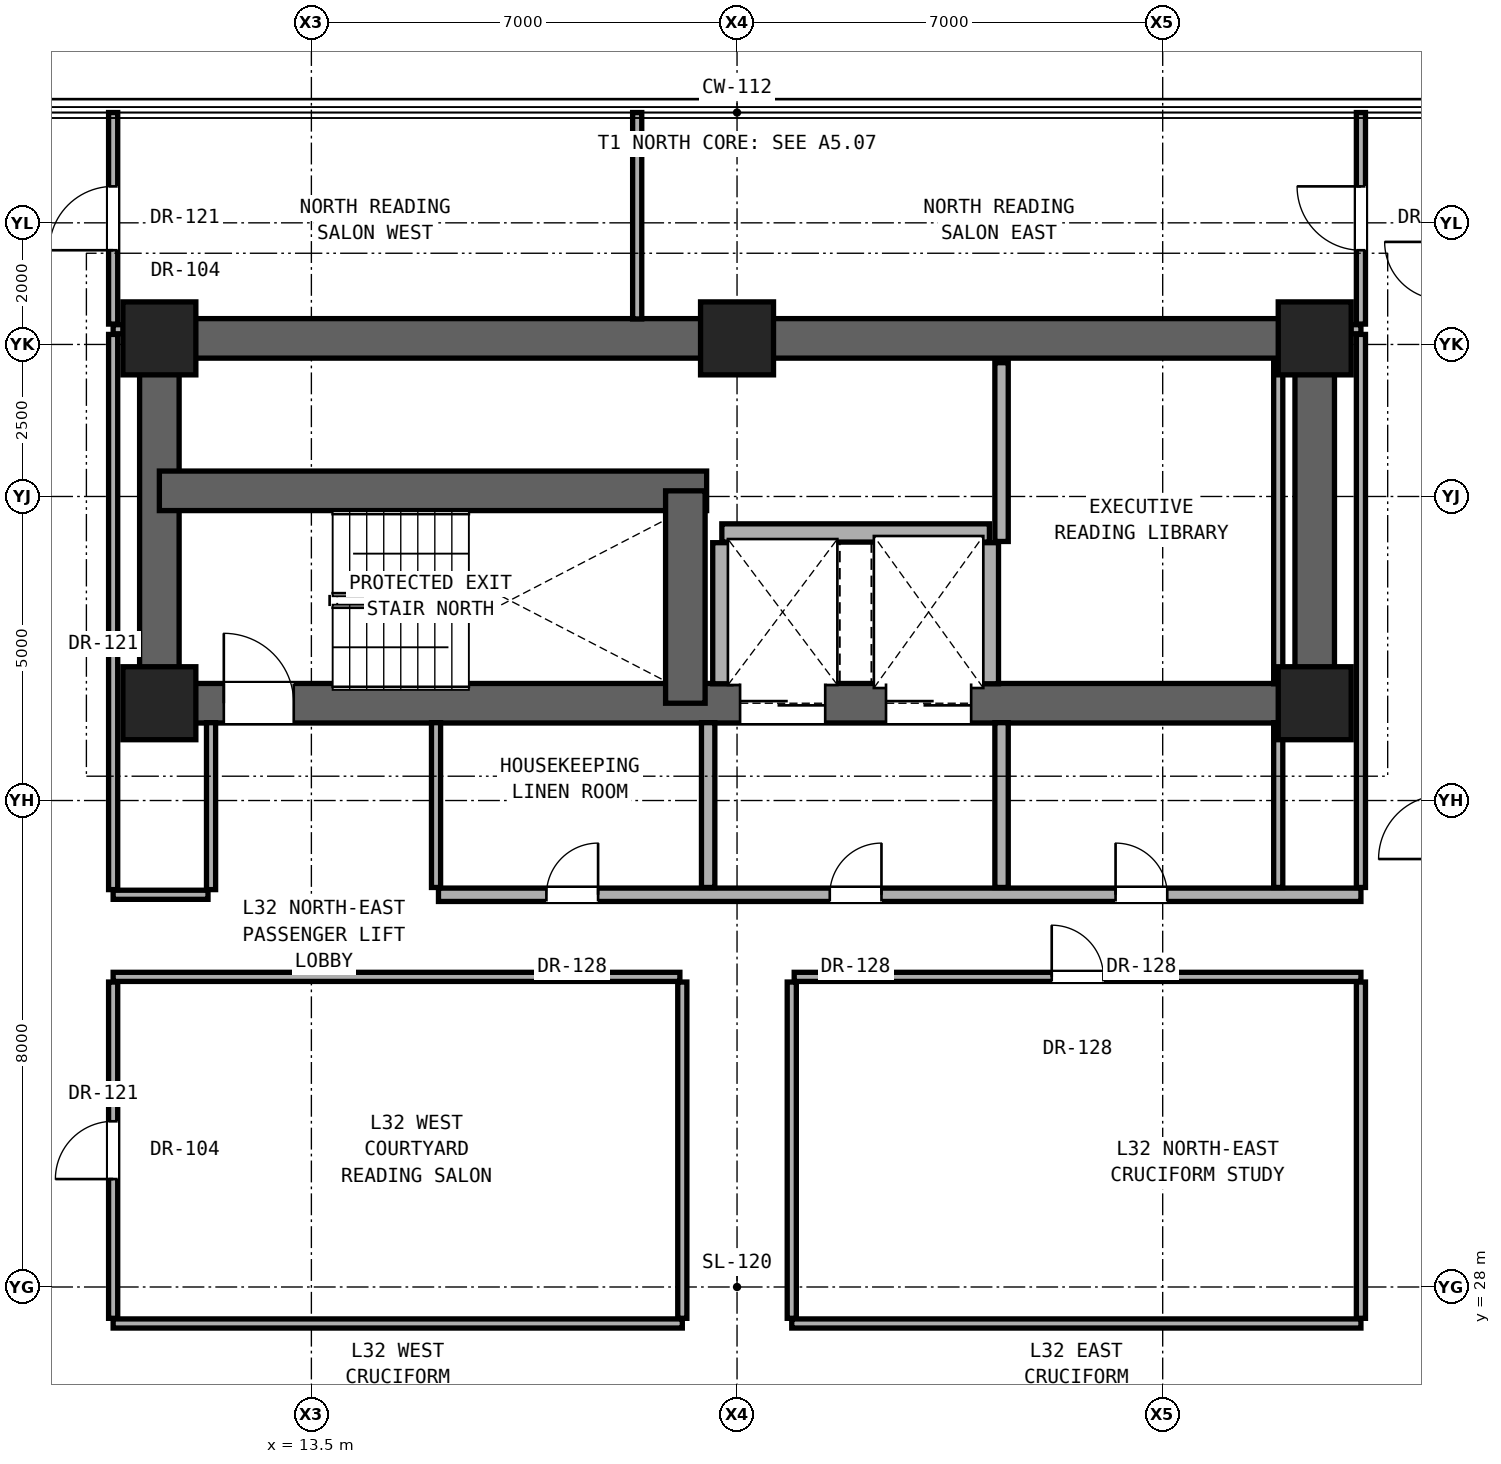
"""IFC4 building model, lengths in metres.
Left out: names, types, materials, properties, quantities, classifications, styles, units other than length and angle.
Written with IfcOpenShell. Run it as: python <this file> out.ifc"""

import sys

from ifc_helpers import new_model, si_unit, direction, frame, frame_2d, origin, origin_2d, place, context, subcontext, project, spatial, rectangle, extrude, element, fill, save


model = new_model("IFC4")
c1 = context("Model", 3, precision=1e-05, world=origin(), true_north=direction((0.0, 1.0)))
c2 = subcontext(c1, "Body", "Model", "MODEL_VIEW")
j1 = project(units=[si_unit("LENGTHUNIT", "METRE"), si_unit("PLANEANGLEUNIT", "RADIAN")], contexts=[c1])
p1 = place(None, origin())
s1 = spatial("IfcSite", under=j1, at=p1, CompositionType="ELEMENT")
p2 = place(p1, origin())
s2 = spatial("IfcBuilding", under=s1, at=p2, CompositionType="ELEMENT")
p3 = place(p2, frame((0.0, 0.0, 114.8)))
s3 = spatial("IfcBuildingStorey", under=s2, at=p3, CompositionType="ELEMENT", Elevation=114.8)
for number, where, z_axis, x_axis in (
    (1, (11.0, 37.6, 0.0), (0.0, 0.0, 1.0), (1.0, 0.0, 0.0)),
    (2, (30.0, 37.6, 0.0), (0.0, 0.0, 1.0), (1.0, 0.0, 0.0)),
    (3, (11.0, 43.6, 0.0), (0.0, 0.0, 1.0), (1.0, 0.0, 0.0)),
    (4, (20.5, 43.6, 0.0), (0.0, 0.0, 1.0), (1.0, 0.0, 0.0)),
    (5, (30.0, 43.6, 0.0), (0.0, 0.0, 1.0), (1.0, 0.0, 0.0)),
):
    element("IfcColumn", number, at=place(p3, frame(where, z_axis=z_axis, x_axis=x_axis)), inside=s3, PredefinedType="COLUMN", context=c2, shape_type="SweptSolid", body=[
        extrude(rectangle(XDim=1.2, YDim=1.2, at=origin_2d()), origin(), (0.0, 0.0, 1.0), 3.3),
    ])
p4 = place(p3, frame((11.0, 43.6, 0.0), z_axis=(0.0, 0.0, 1.0), x_axis=(1.0, 0.0, 0.0)))
e6 = element("IfcWall", 6, at=p4, inside=s3, PredefinedType="SHEAR", context=c2, shape_type="SweptSolid", body=[
    extrude(rectangle(XDim=19.0, YDim=0.65, at=frame_2d((9.5, 0.0))), origin(), (0.0, 0.0, 1.0), 3.08),
])
for number, where, z_axis, x_axis in (
    (7, (11.0, 37.6, 0.0), (0.0, 0.0, 1.0), (0.0, 1.0, 0.0)),
    (8, (30.0, 37.6, 0.0), (0.0, 0.0, 1.0), (0.0, 1.0, 0.0)),
):
    element("IfcWall", number, at=place(p3, frame(where, z_axis=z_axis, x_axis=x_axis)), inside=s3, PredefinedType="SHEAR", context=c2, shape_type="SweptSolid", body=[
        extrude(rectangle(XDim=6.0, YDim=0.65, at=frame_2d((3.0, 0.0))), origin(), (0.0, 0.0, 1.0), 3.08),
    ])
p5 = place(p3, frame((11.0, 37.6, 0.0), z_axis=(0.0, 0.0, 1.0), x_axis=(1.0, 0.0, 0.0)))
e9 = element("IfcWall", 9, at=p5, inside=s3, PredefinedType="SHEAR", context=c2, shape_type="SweptSolid", body=[
    extrude(rectangle(XDim=19.0, YDim=0.65, at=frame_2d((9.5, 0.0))), origin(), (0.0, 0.0, 1.0), 3.08),
])
p6 = place(p5, frame((1.06, 0.0, 0.0)))
e10 = element("IfcOpeningElement", 10, at=p6, cuts=e9, PredefinedType="OPENING", context=c2, shape_type="SweptSolid", body=[
    extrude(rectangle(XDim=1.15, YDim=2.2, at=frame_2d((0.575, 1.1))), frame((0.0, 0.335, 0.0), z_axis=(0.0, -1.0, 0.0), x_axis=(1.0, 0.0, 0.0)), (0.0, 0.0, 1.0), 0.67),
])
p7 = place(p5, frame((9.55, 0.0, 0.0)))
e11 = element("IfcOpeningElement", 11, at=p7, cuts=e9, PredefinedType="OPENING", context=c2, shape_type="SweptSolid", body=[
    extrude(rectangle(XDim=1.4, YDim=2.35, at=frame_2d((0.7, 1.175))), frame((0.0, 0.335, 0.0), z_axis=(0.0, -1.0, 0.0), x_axis=(1.0, 0.0, 0.0)), (0.0, 0.0, 1.0), 0.67),
])
p8 = place(p5, frame((11.95, 0.0, 0.0)))
e12 = element("IfcOpeningElement", 12, at=p8, cuts=e9, PredefinedType="OPENING", context=c2, shape_type="SweptSolid", body=[
    extrude(rectangle(XDim=1.4, YDim=2.35, at=frame_2d((0.7, 1.175))), frame((0.0, 0.335, 0.0), z_axis=(0.0, -1.0, 0.0), x_axis=(1.0, 0.0, 0.0)), (0.0, 0.0, 1.0), 0.67),
])
p9 = place(p3, frame((11.0, 41.093, 0.0), z_axis=(0.0, 0.0, 1.0), x_axis=(1.0, 0.0, 0.0)))
e13 = element("IfcWall", 13, at=p9, inside=s3, PredefinedType="SHEAR", context=c2, shape_type="SweptSolid", body=[
    extrude(rectangle(XDim=9.0, YDim=0.65, at=frame_2d((4.5, 0.0))), origin(), (0.0, 0.0, 1.0), 3.08),
])
p10 = place(p3, frame((19.65, 37.6, 0.0), z_axis=(0.0, 0.0, 1.0), x_axis=(0.0, 1.0, 0.0)))
e14 = element("IfcWall", 14, at=p10, inside=s3, PredefinedType="SHEAR", context=c2, shape_type="SweptSolid", body=[
    extrude(rectangle(XDim=3.493, YDim=0.65, at=frame_2d((1.747, 0.0))), origin(), (0.0, 0.0, 1.0), 3.08),
])
for number, where, z_axis, x_axis in (
    (15, (10.24, 27.4, 0.0), (0.0, 0.0, 1.0), (1.0, 0.0, 0.0)),
    (16, (21.4, 27.4, 0.0), (0.0, 0.0, 1.0), (1.0, 0.0, 0.0)),
):
    element("IfcWall", number, at=place(p3, frame(where, z_axis=z_axis, x_axis=x_axis)), inside=s3, PredefinedType="PARTITIONING", context=c2, shape_type="SweptSolid", body=[
        extrude(rectangle(XDim=9.36, YDim=0.15, at=frame_2d((4.68, 0.0))), origin(), (0.0, 0.0, 1.0), 2.124),
    ])
p11 = place(p3, frame((10.24, 33.1, 0.0), z_axis=(0.0, 0.0, 1.0), x_axis=(1.0, 0.0, 0.0)))
e17 = element("IfcWall", 17, at=p11, inside=s3, PredefinedType="PARTITIONING", context=c2, shape_type="SweptSolid", body=[
    extrude(rectangle(XDim=9.32, YDim=0.15, at=frame_2d((4.66, 0.0))), origin(), (0.0, 0.0, 1.0), 2.124),
])
p12 = place(p3, frame((21.44, 33.1, 0.0), z_axis=(0.0, 0.0, 1.0), x_axis=(1.0, 0.0, 0.0)))
e18 = element("IfcWall", 18, at=p12, inside=s3, PredefinedType="PARTITIONING", context=c2, shape_type="SweptSolid", body=[
    extrude(rectangle(XDim=9.32, YDim=0.15, at=frame_2d((4.66, 0.0))), origin(), (0.0, 0.0, 1.0), 2.124),
])
p13 = place(p12, frame((4.235, 0.0, 0.0)))
e19 = element("IfcOpeningElement", 19, at=p13, cuts=e18, PredefinedType="OPENING", context=c2, shape_type="SweptSolid", body=[
    extrude(rectangle(XDim=0.85, YDim=2.01, at=frame_2d((0.425, 1.005))), frame((0.0, 0.085, 0.0), z_axis=(0.0, -1.0, 0.0), x_axis=(1.0, 0.0, 0.0)), (0.0, 0.0, 1.0), 0.17),
])
p14 = place(p3, frame((10.24, 34.45, 0.0), z_axis=(0.0, 0.0, 1.0), x_axis=(1.0, 0.0, 0.0)))
e20 = element("IfcWall", 20, at=p14, inside=s3, PredefinedType="PARTITIONING", context=c2, shape_type="SweptSolid", body=[
    extrude(rectangle(XDim=1.56, YDim=0.15, at=frame_2d((0.78, 0.0))), origin(), (0.0, 0.0, 1.0), 2.124),
])
p15 = place(p3, frame((15.59, 34.45, 0.0), z_axis=(0.0, 0.0, 1.0), x_axis=(1.0, 0.0, 0.0)))
e21 = element("IfcWall", 21, at=p15, inside=s3, PredefinedType="SOLIDWALL", context=c2, shape_type="SweptSolid", body=[
    extrude(rectangle(XDim=15.17, YDim=0.22, at=frame_2d((7.585, 0.0))), origin(), (0.0, 0.0, 1.0), 2.124),
])
p16 = place(p15, frame((6.435, 0.0, 0.0)))
e22 = element("IfcOpeningElement", 22, at=p16, cuts=e21, PredefinedType="OPENING", context=c2, shape_type="SweptSolid", body=[
    extrude(rectangle(XDim=0.85, YDim=2.01, at=frame_2d((0.425, 1.005))), frame((0.0, 0.12, 0.0), z_axis=(0.0, -1.0, 0.0), x_axis=(1.0, 0.0, 0.0)), (0.0, 0.0, 1.0), 0.24),
])
p17 = place(p15, frame((11.135, 0.0, 0.0)))
e23 = element("IfcOpeningElement", 23, at=p17, cuts=e21, PredefinedType="OPENING", context=c2, shape_type="SweptSolid", body=[
    extrude(rectangle(XDim=0.85, YDim=2.01, at=frame_2d((0.425, 1.005))), frame((0.0, 0.12, 0.0), z_axis=(0.0, -1.0, 0.0), x_axis=(1.0, 0.0, 0.0)), (0.0, 0.0, 1.0), 0.24),
])
p18 = place(p15, frame((1.775, 0.0, 0.0)))
e24 = element("IfcOpeningElement", 24, at=p18, cuts=e21, PredefinedType="OPENING", context=c2, shape_type="SweptSolid", body=[
    extrude(rectangle(XDim=0.85, YDim=2.01, at=frame_2d((0.425, 1.005))), frame((0.0, 0.12, 0.0), z_axis=(0.0, -1.0, 0.0), x_axis=(1.0, 0.0, 0.0)), (0.0, 0.0, 1.0), 0.24),
])
p19 = place(p3, frame((20.25, 40.4, 0.0), z_axis=(0.0, 0.0, 1.0), x_axis=(1.0, 0.0, 0.0)))
e25 = element("IfcWall", 25, at=p19, inside=s3, PredefinedType="SOLIDWALL", context=c2, shape_type="SweptSolid", body=[
    extrude(rectangle(XDim=4.4, YDim=0.3, at=frame_2d((2.2, 0.0))), origin(), (0.0, 0.0, 1.0), 3.08),
])
for number, where, z_axis, x_axis in (
    (26, (10.24, 43.75, 0.0), (0.0, 0.0, 1.0), (1.0, 0.0, 0.0)),
    (27, (30.32, 43.75, 0.0), (0.0, 0.0, 1.0), (1.0, 0.0, 0.0)),
):
    element("IfcWall", number, at=place(p3, frame(where, z_axis=z_axis, x_axis=x_axis)), inside=s3, PredefinedType="PARTITIONING", context=c2, shape_type="SweptSolid", body=[
        extrude(rectangle(XDim=0.44, YDim=0.15, at=frame_2d((0.22, 0.0))), origin(), (0.0, 0.0, 1.0), 3.08),
    ])
p20 = place(p3, frame((10.24, 27.485, 0.0), z_axis=(0.0, 0.0, 1.0), x_axis=(0.0, 1.0, 0.0)))
e28 = element("IfcWall", 28, at=p20, inside=s3, PredefinedType="PARTITIONING", context=c2, shape_type="SweptSolid", body=[
    extrude(rectangle(XDim=5.53, YDim=0.15, at=frame_2d((2.765, 0.0))), origin(), (0.0, 0.0, 1.0), 2.299),
])
p21 = place(p20, frame((2.29, 0.0, 0.0)))
e29 = element("IfcOpeningElement", 29, at=p21, cuts=e28, PredefinedType="OPENING", context=c2, shape_type="SweptSolid", body=[
    extrude(rectangle(XDim=0.95, YDim=2.15, at=frame_2d((0.475, 1.075))), frame((0.0, 0.085, 0.0), z_axis=(0.0, -1.0, 0.0), x_axis=(1.0, 0.0, 0.0)), (0.0, 0.0, 1.0), 0.17),
])
p22 = place(p3, frame((10.24, 34.535, 0.0), z_axis=(0.0, 0.0, 1.0), x_axis=(0.0, 1.0, 0.0)))
e30 = element("IfcWall", 30, at=p22, inside=s3, PredefinedType="PARTITIONING", context=c2, shape_type="SweptSolid", body=[
    extrude(rectangle(XDim=9.13, YDim=0.15, at=frame_2d((4.565, 0.0))), origin(), (0.0, 0.0, 1.0), 2.456),
])
p23 = place(p3, frame((10.24, 43.835, 0.0), z_axis=(0.0, 0.0, 1.0), x_axis=(0.0, 1.0, 0.0)))
e31 = element("IfcWall", 31, at=p23, inside=s3, PredefinedType="PARTITIONING", context=c2, shape_type="SweptSolid", body=[
    extrude(rectangle(XDim=3.479, YDim=0.15, at=frame_2d((1.74, 0.0))), origin(), (0.0, 0.0, 1.0), 3.08),
])
p24 = place(p23, frame((1.215, 0.0, 0.0)))
e32 = element("IfcOpeningElement", 32, at=p24, cuts=e31, PredefinedType="OPENING", context=c2, shape_type="SweptSolid", body=[
    extrude(rectangle(XDim=1.05, YDim=2.2, at=frame_2d((0.525, 1.1))), frame((0.0, 0.085, 0.0), z_axis=(0.0, -1.0, 0.0), x_axis=(1.0, 0.0, 0.0)), (0.0, 0.0, 1.0), 0.17),
])
p25 = place(p3, frame((11.85, 34.535, 0.0), z_axis=(0.0, 0.0, 1.0), x_axis=(0.0, 1.0, 0.0)))
e33 = element("IfcWall", 33, at=p25, inside=s3, PredefinedType="PARTITIONING", context=c2, shape_type="SweptSolid", body=[
    extrude(rectangle(XDim=2.745, YDim=0.15, at=frame_2d((1.373, 0.0))), origin(), (0.0, 0.0, 1.0), 3.08),
])
p26 = place(p3, frame((15.55, 34.57, 0.0), z_axis=(0.0, 0.0, 1.0), x_axis=(0.0, 1.0, 0.0)))
e34 = element("IfcWall", 34, at=p26, inside=s3, PredefinedType="PARTITIONING", context=c2, shape_type="SweptSolid", body=[
    extrude(rectangle(XDim=2.71, YDim=0.15, at=frame_2d((1.355, 0.0))), origin(), (0.0, 0.0, 1.0), 2.609),
])
p27 = place(p3, frame((18.858, 43.92, 0.0), z_axis=(0.0, 0.0, 1.0), x_axis=(0.0, 1.0, 0.0)))
e35 = element("IfcWall", 35, at=p27, inside=s3, PredefinedType="PARTITIONING", context=c2, shape_type="SweptSolid", body=[
    extrude(rectangle(XDim=3.394, YDim=0.15, at=frame_2d((1.697, 0.0))), origin(), (0.0, 0.0, 1.0), 3.08),
])
p28 = place(p3, frame((19.6, 27.485, 0.0), z_axis=(0.0, 0.0, 1.0), x_axis=(0.0, 1.0, 0.0)))
e36 = element("IfcWall", 36, at=p28, inside=s3, PredefinedType="PARTITIONING", context=c2, shape_type="SweptSolid", body=[
    extrude(rectangle(XDim=5.53, YDim=0.15, at=frame_2d((2.765, 0.0))), origin(), (0.0, 0.0, 1.0), 2.124),
])
p29 = place(p3, frame((20.025, 34.57, 0.0), z_axis=(0.0, 0.0, 1.0), x_axis=(0.0, 1.0, 0.0)))
e37 = element("IfcWall", 37, at=p29, inside=s3, PredefinedType="SOLIDWALL", context=c2, shape_type="SweptSolid", body=[
    extrude(rectangle(XDim=2.71, YDim=0.22, at=frame_2d((1.355, 0.0))), origin(), (0.0, 0.0, 1.0), 3.08),
])
p30 = place(p3, frame((20.25, 37.92, 0.0), z_axis=(0.0, 0.0, 1.0), x_axis=(0.0, 1.0, 0.0)))
e38 = element("IfcWall", 38, at=p30, inside=s3, PredefinedType="SOLIDWALL", context=c2, shape_type="SweptSolid", body=[
    extrude(rectangle(XDim=2.32, YDim=0.3, at=frame_2d((1.16, 0.0))), origin(), (0.0, 0.0, 1.0), 3.08),
])
p31 = place(p3, frame((21.4, 27.485, 0.0), z_axis=(0.0, 0.0, 1.0), x_axis=(0.0, 1.0, 0.0)))
e39 = element("IfcWall", 39, at=p31, inside=s3, PredefinedType="PARTITIONING", context=c2, shape_type="SweptSolid", body=[
    extrude(rectangle(XDim=5.53, YDim=0.15, at=frame_2d((2.765, 0.0))), origin(), (0.0, 0.0, 1.0), 2.124),
])
p32 = place(p3, frame((24.65, 37.92, 0.0), z_axis=(0.0, 0.0, 1.0), x_axis=(0.0, 1.0, 0.0)))
e40 = element("IfcWall", 40, at=p32, inside=s3, PredefinedType="SOLIDWALL", context=c2, shape_type="SweptSolid", body=[
    extrude(rectangle(XDim=2.32, YDim=0.3, at=frame_2d((1.16, 0.0))), origin(), (0.0, 0.0, 1.0), 3.08),
])
p33 = place(p3, frame((24.85, 34.57, 0.0), z_axis=(0.0, 0.0, 1.0), x_axis=(0.0, 1.0, 0.0)))
e41 = element("IfcWall", 41, at=p33, inside=s3, PredefinedType="SOLIDWALL", context=c2, shape_type="SweptSolid", body=[
    extrude(rectangle(XDim=2.71, YDim=0.22, at=frame_2d((1.355, 0.0))), origin(), (0.0, 0.0, 1.0), 3.08),
])
p34 = place(p3, frame((24.85, 40.26, 0.0), z_axis=(0.0, 0.0, 1.0), x_axis=(0.0, 1.0, 0.0)))
e42 = element("IfcWall", 42, at=p34, inside=s3, PredefinedType="SOLIDWALL", context=c2, shape_type="SweptSolid", body=[
    extrude(rectangle(XDim=2.94, YDim=0.22, at=frame_2d((1.47, 0.0))), origin(), (0.0, 0.0, 1.0), 3.08),
])
p35 = place(p3, frame((29.4, 34.57, 0.0), z_axis=(0.0, 0.0, 1.0), x_axis=(0.0, 1.0, 0.0)))
e43 = element("IfcWall", 43, at=p35, inside=s3, PredefinedType="PARTITIONING", context=c2, shape_type="SweptSolid", body=[
    extrude(rectangle(XDim=2.71, YDim=0.15, at=frame_2d((1.355, 0.0))), origin(), (0.0, 0.0, 1.0), 3.08),
])
p36 = place(p3, frame((29.4, 37.92, 0.0), z_axis=(0.0, 0.0, 1.0), x_axis=(0.0, 1.0, 0.0)))
e44 = element("IfcWall", 44, at=p36, inside=s3, PredefinedType="PARTITIONING", context=c2, shape_type="SweptSolid", body=[
    extrude(rectangle(XDim=5.28, YDim=0.15, at=frame_2d((2.64, 0.0))), origin(), (0.0, 0.0, 1.0), 3.08),
])
p37 = place(p3, frame((30.76, 27.485, 0.0), z_axis=(0.0, 0.0, 1.0), x_axis=(0.0, 1.0, 0.0)))
e45 = element("IfcWall", 45, at=p37, inside=s3, PredefinedType="PARTITIONING", context=c2, shape_type="SweptSolid", body=[
    extrude(rectangle(XDim=5.53, YDim=0.15, at=frame_2d((2.765, 0.0))), origin(), (0.0, 0.0, 1.0), 2.299),
])
p38 = place(p3, frame((30.76, 34.57, 0.0), z_axis=(0.0, 0.0, 1.0), x_axis=(0.0, 1.0, 0.0)))
e46 = element("IfcWall", 46, at=p38, inside=s3, PredefinedType="PARTITIONING", context=c2, shape_type="SweptSolid", body=[
    extrude(rectangle(XDim=9.095, YDim=0.15, at=frame_2d((4.547, 0.0))), origin(), (0.0, 0.0, 1.0), 2.456),
])
p39 = place(p3, frame((30.76, 43.835, 0.0), z_axis=(0.0, 0.0, 1.0), x_axis=(0.0, 1.0, 0.0)))
e47 = element("IfcWall", 47, at=p39, inside=s3, PredefinedType="PARTITIONING", context=c2, shape_type="SweptSolid", body=[
    extrude(rectangle(XDim=3.479, YDim=0.15, at=frame_2d((1.74, 0.0))), origin(), (0.0, 0.0, 1.0), 3.08),
])
p40 = place(p39, frame((1.215, 0.0, 0.0)))
e48 = element("IfcOpeningElement", 48, at=p40, cuts=e47, PredefinedType="OPENING", context=c2, shape_type="SweptSolid", body=[
    extrude(rectangle(XDim=1.05, YDim=2.2, at=frame_2d((0.525, 1.1))), frame((0.0, 0.085, 0.0), z_axis=(0.0, -1.0, 0.0), x_axis=(1.0, 0.0, 0.0)), (0.0, 0.0, 1.0), 0.17),
])
p41 = place(p6, origin())
e49 = element("IfcDoor", 49, at=p41, inside=s3, OperationType="SINGLE_SWING_LEFT", PredefinedType="DOOR", context=c2, shape_type="SweptSolid", body=[
    extrude(rectangle(XDim=1.15, YDim=2.2, at=frame_2d((0.575, 1.1))), frame((0.0, 0.025, 0.0), z_axis=(0.0, -1.0, 0.0), x_axis=(1.0, 0.0, 0.0)), (0.0, 0.0, 1.0), 0.05),
])
fill(e10, e49)
p42 = place(p16, origin())
e50 = element("IfcDoor", 50, at=p42, inside=s3, OperationType="SINGLE_SWING_RIGHT", PredefinedType="DOOR", context=c2, shape_type="SweptSolid", body=[
    extrude(rectangle(XDim=0.85, YDim=2.01, at=frame_2d((0.425, 1.005))), frame((0.0, 0.025, 0.0), z_axis=(0.0, -1.0, 0.0), x_axis=(1.0, 0.0, 0.0)), (0.0, 0.0, 1.0), 0.05),
])
fill(e22, e50)
p43 = place(p17, origin())
e51 = element("IfcDoor", 51, at=p43, inside=s3, OperationType="SINGLE_SWING_LEFT", PredefinedType="DOOR", context=c2, shape_type="SweptSolid", body=[
    extrude(rectangle(XDim=0.85, YDim=2.01, at=frame_2d((0.425, 1.005))), frame((0.0, 0.025, 0.0), z_axis=(0.0, -1.0, 0.0), x_axis=(1.0, 0.0, 0.0)), (0.0, 0.0, 1.0), 0.05),
])
fill(e23, e51)
p44 = place(p18, origin())
e52 = element("IfcDoor", 52, at=p44, inside=s3, OperationType="SINGLE_SWING_RIGHT", PredefinedType="DOOR", context=c2, shape_type="SweptSolid", body=[
    extrude(rectangle(XDim=0.85, YDim=2.01, at=frame_2d((0.425, 1.005))), frame((0.0, 0.025, 0.0), z_axis=(0.0, -1.0, 0.0), x_axis=(1.0, 0.0, 0.0)), (0.0, 0.0, 1.0), 0.05),
])
fill(e24, e52)
p45 = place(p21, origin())
e53 = element("IfcDoor", 53, at=p45, inside=s3, OperationType="SINGLE_SWING_LEFT", PredefinedType="DOOR", context=c2, shape_type="SweptSolid", body=[
    extrude(rectangle(XDim=0.95, YDim=2.15, at=frame_2d((0.475, 1.075))), frame((0.0, 0.025, 0.0), z_axis=(0.0, -1.0, 0.0), x_axis=(1.0, 0.0, 0.0)), (0.0, 0.0, 1.0), 0.05),
])
fill(e29, e53)
p46 = place(p13, origin())
e54 = element("IfcDoor", 54, at=p46, inside=s3, OperationType="SINGLE_SWING_LEFT", PredefinedType="DOOR", context=c2, shape_type="SweptSolid", body=[
    extrude(rectangle(XDim=0.85, YDim=2.01, at=frame_2d((0.425, 1.005))), frame((0.0, 0.025, 0.0), z_axis=(0.0, -1.0, 0.0), x_axis=(1.0, 0.0, 0.0)), (0.0, 0.0, 1.0), 0.05),
])
fill(e19, e54)
p47 = place(p24, origin())
e55 = element("IfcDoor", 55, at=p47, inside=s3, OperationType="SINGLE_SWING_LEFT", PredefinedType="DOOR", context=c2, shape_type="SweptSolid", body=[
    extrude(rectangle(XDim=1.05, YDim=2.2, at=frame_2d((0.525, 1.1))), frame((0.0, 0.025, 0.0), z_axis=(0.0, -1.0, 0.0), x_axis=(1.0, 0.0, 0.0)), (0.0, 0.0, 1.0), 0.05),
])
fill(e32, e55)
p48 = place(p40, origin())
e56 = element("IfcDoor", 56, at=p48, inside=s3, OperationType="SINGLE_SWING_RIGHT", PredefinedType="DOOR", context=c2, shape_type="SweptSolid", body=[
    extrude(rectangle(XDim=1.05, YDim=2.2, at=frame_2d((0.525, 1.1))), frame((0.0, 0.025, 0.0), z_axis=(0.0, -1.0, 0.0), x_axis=(1.0, 0.0, 0.0)), (0.0, 0.0, 1.0), 0.05),
])
fill(e48, e56)
p49 = place(p7, origin())
e57 = element("IfcDoor", 57, at=p49, inside=s3, OperationType="DOUBLE_DOOR_SLIDING", PredefinedType="DOOR", context=c2, shape_type="SweptSolid", body=[
    extrude(rectangle(XDim=1.4, YDim=2.35, at=frame_2d((0.7, 1.175))), frame((0.0, 0.025, 0.0), z_axis=(0.0, -1.0, 0.0), x_axis=(1.0, 0.0, 0.0)), (0.0, 0.0, 1.0), 0.05),
])
fill(e11, e57)
p50 = place(p8, origin())
e58 = element("IfcDoor", 58, at=p50, inside=s3, OperationType="DOUBLE_DOOR_SLIDING", PredefinedType="DOOR", context=c2, shape_type="SweptSolid", body=[
    extrude(rectangle(XDim=1.4, YDim=2.35, at=frame_2d((0.7, 1.175))), frame((0.0, 0.025, 0.0), z_axis=(0.0, -1.0, 0.0), x_axis=(1.0, 0.0, 0.0)), (0.0, 0.0, 1.0), 0.05),
])
fill(e12, e58)
save(model, sys.argv[1])
